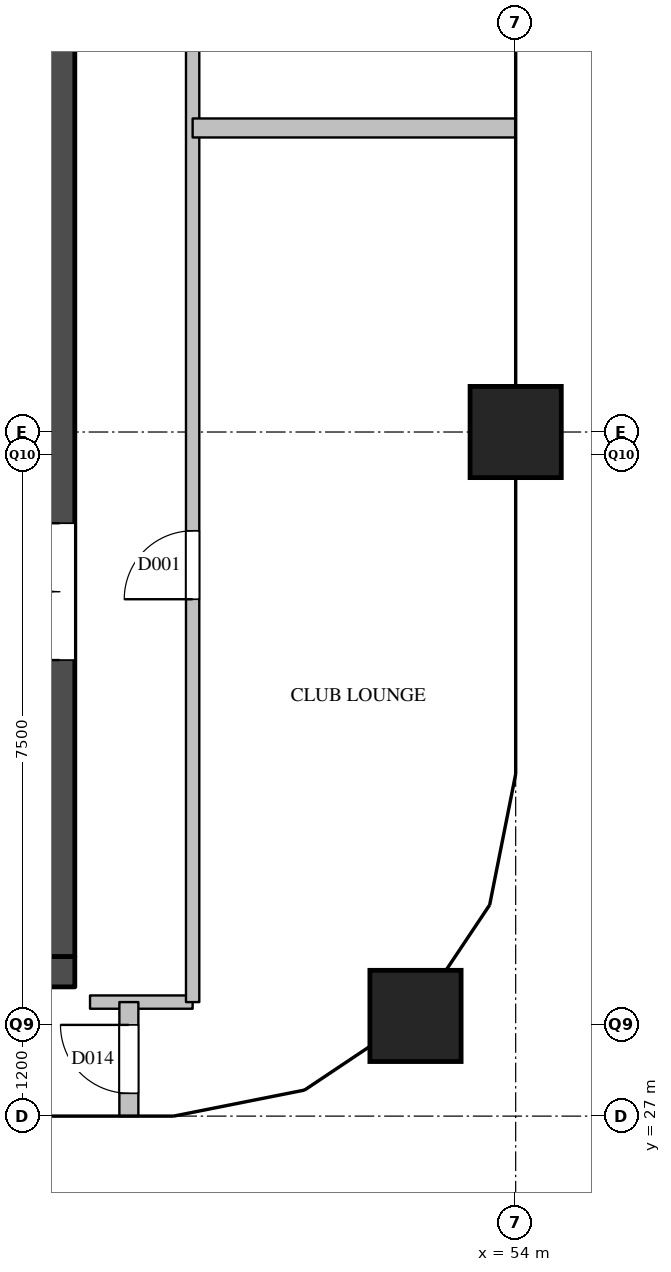
"""IFC4 building model, lengths in metres.
Left out: names, types, materials, properties, quantities, classifications, styles, units other than length and angle.
Written with IfcOpenShell. Run it as: python <this file> out.ifc"""

import sys

from ifc_helpers import new_model, si_unit, direction, frame, frame_2d, origin, origin_2d, place, context, subcontext, project, spatial, rectangle, extrude, element, fill, save


model = new_model("IFC4")
c1 = context("Model", 3, precision=1e-05, world=origin(), true_north=direction((0.0, 1.0)))
c2 = subcontext(c1, "Body", "Model", "MODEL_VIEW")
j1 = project(units=[si_unit("LENGTHUNIT", "METRE"), si_unit("PLANEANGLEUNIT", "RADIAN")], contexts=[c1])
p1 = place(None, origin())
s1 = spatial("IfcSite", under=j1, at=p1, CompositionType="ELEMENT")
p2 = place(p1, origin())
s2 = spatial("IfcBuilding", under=s1, at=p2, CompositionType="ELEMENT")
p3 = place(p2, frame((0.0, 0.0, 265.7)))
s3 = spatial("IfcBuildingStorey", under=s2, at=p3, CompositionType="ELEMENT", Elevation=265.7)
for number, where, z_axis, x_axis in (
    (1, (52.682, 28.318, 0.0), (0.0, 0.0, 1.0), (1.0, 0.0, 0.0)),
    (2, (54.0, 36.0, 0.0), (0.0, 0.0, 1.0), (1.0, 0.0, 0.0)),
):
    element("IfcColumn", number, at=place(p3, frame(where, z_axis=z_axis, x_axis=x_axis)), inside=s3, PredefinedType="COLUMN", context=c2, shape_type="SweptSolid", body=[
        extrude(rectangle(XDim=1.2, YDim=1.2, at=origin_2d()), origin(), (0.0, 0.0, 1.0), 3.9),
    ])
p4 = place(p3, frame((36.2, 28.9, 0.0), z_axis=(0.0, 0.0, 1.0), x_axis=(1.0, 0.0, 0.0)))
e3 = element("IfcWall", 3, at=p4, inside=s3, PredefinedType="SHEAR", context=c2, shape_type="SweptSolid", body=[
    extrude(rectangle(XDim=12.0, YDim=0.4, at=frame_2d((6.0, 0.0))), origin(), (0.0, 0.0, 1.0), 3.6),
])
p5 = place(p4, frame((0.85, 0.0, 0.0)))
e4 = element("IfcOpeningElement", 4, at=p5, cuts=e3, PredefinedType="OPENING", context=c2, shape_type="SweptSolid", body=[
    extrude(rectangle(XDim=1.2, YDim=2.1, at=frame_2d((0.6, 1.05))), frame((0.0, 0.21, 0.0), z_axis=(0.0, -1.0, 0.0), x_axis=(1.0, 0.0, 0.0)), (0.0, 0.0, 1.0), 0.42),
])
p6 = place(p4, frame((2.95, 0.0, 0.0)))
e5 = element("IfcOpeningElement", 5, at=p6, cuts=e3, PredefinedType="OPENING", context=c2, shape_type="SweptSolid", body=[
    extrude(rectangle(XDim=1.2, YDim=2.1, at=frame_2d((0.6, 1.05))), frame((0.0, 0.21, 0.0), z_axis=(0.0, -1.0, 0.0), x_axis=(1.0, 0.0, 0.0)), (0.0, 0.0, 1.0), 0.42),
])
p7 = place(p4, frame((5.05, 0.0, 0.0)))
e6 = element("IfcOpeningElement", 6, at=p7, cuts=e3, PredefinedType="OPENING", context=c2, shape_type="SweptSolid", body=[
    extrude(rectangle(XDim=1.2, YDim=2.1, at=frame_2d((0.6, 1.05))), frame((0.0, 0.21, 0.0), z_axis=(0.0, -1.0, 0.0), x_axis=(1.0, 0.0, 0.0)), (0.0, 0.0, 1.0), 0.42),
])
p8 = place(p3, frame((48.0, 29.1, 0.0), z_axis=(0.0, 0.0, 1.0), x_axis=(0.0, 1.0, 0.0)))
e7 = element("IfcWall", 7, at=p8, inside=s3, PredefinedType="SHEAR", context=c2, shape_type="SweptSolid", body=[
    extrude(rectangle(XDim=20.3, YDim=0.4, at=frame_2d((10.15, 0.0))), origin(), (0.0, 0.0, 1.0), 3.6),
])
p9 = place(p8, frame((12.5, 0.0, 0.0)))
e8 = element("IfcOpeningElement", 8, at=p9, cuts=e7, PredefinedType="OPENING", context=c2, shape_type="SweptSolid", body=[
    extrude(rectangle(XDim=0.7, YDim=2.1, at=frame_2d((0.35, 1.05))), frame((0.0, 0.21, 0.0), z_axis=(0.0, -1.0, 0.0), x_axis=(1.0, 0.0, 0.0)), (0.0, 0.0, 1.0), 0.42),
])
p10 = place(p8, frame((3.9, 0.0, 0.0)))
e9 = element("IfcOpeningElement", 9, at=p10, cuts=e7, PredefinedType="OPENING", context=c2, shape_type="SweptSolid", body=[
    extrude(rectangle(XDim=1.8, YDim=2.1, at=frame_2d((0.9, 1.05))), frame((0.0, 0.21, 0.0), z_axis=(0.0, -1.0, 0.0), x_axis=(1.0, 0.0, 0.0)), (0.0, 0.0, 1.0), 0.42),
])
p11 = place(p3, frame((48.4, 28.5, 0.0), z_axis=(0.0, 0.0, 1.0), x_axis=(1.0, 0.0, 0.0)))
e10 = element("IfcWall", 10, at=p11, inside=s3, PredefinedType="PARTITIONING", context=c2, shape_type="SweptSolid", body=[
    extrude(rectangle(XDim=1.35, YDim=0.175, at=frame_2d((0.675, 0.0))), origin(), (0.0, 0.0, 1.0), 3.6),
])
p12 = place(p3, frame((49.75, 28.5, 0.0), z_axis=(0.0, 0.0, 1.0), x_axis=(0.0, 1.0, 0.0)))
e11 = element("IfcWall", 11, at=p12, inside=s3, PredefinedType="PARTITIONING", context=c2, shape_type="SweptSolid", body=[
    extrude(rectangle(XDim=22.85, YDim=0.175, at=frame_2d((11.425, 0.0))), origin(), (0.0, 0.0, 1.0), 3.6),
])
p13 = place(p12, frame((5.3, 0.0, 0.0)))
e12 = element("IfcOpeningElement", 12, at=p13, cuts=e11, PredefinedType="OPENING", context=c2, shape_type="SweptSolid", body=[
    extrude(rectangle(XDim=0.9, YDim=2.1, at=frame_2d((0.45, 1.05))), frame((0.0, 0.097, 0.0), z_axis=(0.0, -1.0, 0.0), x_axis=(1.0, 0.0, 0.0)), (0.0, 0.0, 1.0), 0.195),
])
p14 = place(p12, frame((16.725, 0.0, 0.0)))
e13 = element("IfcOpeningElement", 13, at=p14, cuts=e11, PredefinedType="OPENING", context=c2, shape_type="SweptSolid", body=[
    extrude(rectangle(XDim=0.9, YDim=2.1, at=frame_2d((0.45, 1.05))), frame((0.0, 0.097, 0.0), z_axis=(0.0, -1.0, 0.0), x_axis=(1.0, 0.0, 0.0)), (0.0, 0.0, 1.0), 0.195),
])
p15 = place(p3, frame((49.75, 40.0, 0.0), z_axis=(0.0, 0.0, 1.0), x_axis=(1.0, 0.0, 0.0)))
e14 = element("IfcWall", 14, at=p15, inside=s3, PredefinedType="PARTITIONING", context=c2, shape_type="SweptSolid", body=[
    extrude(rectangle(XDim=4.25, YDim=0.25, at=frame_2d((2.125, 0.0))), origin(), (0.0, 0.0, 1.0), 2.6),
])
p16 = place(p3, frame((48.911, 27.0, 0.0), z_axis=(0.0, 0.0, 1.0), x_axis=(0.0, 1.0, 0.0)))
e15 = element("IfcWall", 15, at=p16, inside=s3, PredefinedType="PARTITIONING", context=c2, shape_type="SweptSolid", body=[
    extrude(rectangle(XDim=1.5, YDim=0.25, at=frame_2d((0.75, 0.0))), origin(), (0.0, 0.0, 1.0), 2.6),
])
p17 = place(p16, frame((0.3, 0.0, 0.0)))
e16 = element("IfcOpeningElement", 16, at=p17, cuts=e15, PredefinedType="OPENING", context=c2, shape_type="SweptSolid", body=[
    extrude(rectangle(XDim=0.9, YDim=2.1, at=frame_2d((0.45, 1.05))), frame((0.0, 0.135, 0.0), z_axis=(0.0, -1.0, 0.0), x_axis=(1.0, 0.0, 0.0)), (0.0, 0.0, 1.0), 0.27),
])
p18 = place(p10, origin())
e17 = element("IfcDoor", 17, at=p18, inside=s3, OperationType="DOUBLE_DOOR_SINGLE_SWING", PredefinedType="DOOR", context=c2, shape_type="SweptSolid", body=[
    extrude(rectangle(XDim=1.8, YDim=2.1, at=frame_2d((0.9, 1.05))), frame((0.0, 0.025, 0.0), z_axis=(0.0, -1.0, 0.0), x_axis=(1.0, 0.0, 0.0)), (0.0, 0.0, 1.0), 0.05),
])
fill(e9, e17)
p19 = place(p13, origin())
e18 = element("IfcDoor", 18, at=p19, inside=s3, OperationType="SINGLE_SWING_LEFT", PredefinedType="DOOR", context=c2, shape_type="SweptSolid", body=[
    extrude(rectangle(XDim=0.9, YDim=2.1, at=frame_2d((0.45, 1.05))), frame((0.0, 0.025, 0.0), z_axis=(0.0, -1.0, 0.0), x_axis=(1.0, 0.0, 0.0)), (0.0, 0.0, 1.0), 0.05),
])
fill(e12, e18)
p20 = place(p17, origin())
e19 = element("IfcDoor", 19, at=p20, inside=s3, OperationType="SINGLE_SWING_RIGHT", PredefinedType="DOOR", context=c2, shape_type="SweptSolid", body=[
    extrude(rectangle(XDim=0.9, YDim=2.1, at=frame_2d((0.45, 1.05))), frame((0.0, 0.025, 0.0), z_axis=(0.0, -1.0, 0.0), x_axis=(1.0, 0.0, 0.0)), (0.0, 0.0, 1.0), 0.05),
])
fill(e16, e19)
save(model, sys.argv[1])
